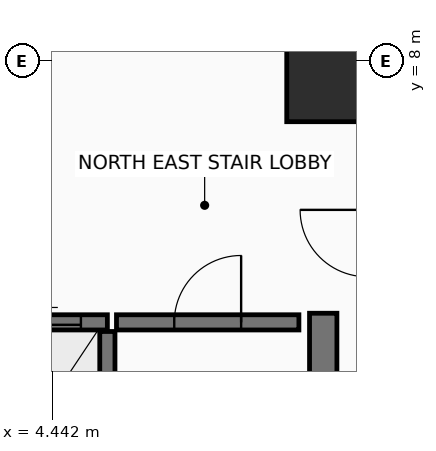
"""IFC4 building model, lengths in metres.
Left out: names, types, materials, properties, quantities, classifications, styles, units other than length and angle.
Written with IfcOpenShell. Run it as: python <this file> out.ifc"""

import sys

from ifc_helpers import new_model, si_unit, direction, frame, frame_2d, origin, origin_2d, place, context, subcontext, project, spatial, rectangle, extrude, element, fill, save


model = new_model("IFC4")
c1 = context("Model", 3, precision=1e-05, world=origin(), true_north=direction((0.0, 1.0)))
c2 = subcontext(c1, "Body", "Model", "MODEL_VIEW")
j1 = project(units=[si_unit("LENGTHUNIT", "METRE"), si_unit("PLANEANGLEUNIT", "RADIAN")], contexts=[c1])
p1 = place(None, origin())
s1 = spatial("IfcSite", under=j1, at=p1, CompositionType="ELEMENT")
p2 = place(p1, origin())
s2 = spatial("IfcBuilding", under=s1, at=p2, CompositionType="ELEMENT")
p3 = place(p2, frame((0.0, 0.0, 170.5)))
s3 = spatial("IfcBuildingStorey", under=s2, at=p3, CompositionType="ELEMENT", Elevation=170.5)
p4 = place(p3, frame((8.9, 7.6, 0.0), z_axis=(0.0, 0.0, 1.0), x_axis=(1.0, 0.0, 0.0)))
e1 = element("IfcColumn", 1, at=p4, inside=s3, PredefinedType="COLUMN", context=c2, shape_type="SweptSolid", body=[
    extrude(rectangle(XDim=1.2, YDim=1.2, at=origin_2d()), origin(), (0.0, 0.0, 1.0), 3.6),
])
p5 = place(p3, frame((8.9, -6.85, 0.0), z_axis=(0.0, 0.0, 1.0), x_axis=(0.0, 1.0, 0.0)))
e2 = element("IfcWall", 2, at=p5, inside=s3, PredefinedType="SHEAR", context=c2, shape_type="SweptSolid", body=[
    extrude(rectangle(XDim=10.7, YDim=0.45, at=frame_2d((5.35, 0.0))), origin(), (0.0, 0.0, 1.0), 3.42),
])
p6 = place(p3, frame((5.35, -3.75, 0.0), z_axis=(0.0, 0.0, 1.0), x_axis=(0.0, 1.0, 0.0)))
e3 = element("IfcWall", 3, at=p6, inside=s3, PredefinedType="SHEAR", context=c2, shape_type="SweptSolid", body=[
    extrude(rectangle(XDim=7.3, YDim=0.25, at=frame_2d((3.65, 0.0))), origin(), (0.0, 0.0, 1.0), 3.42),
])
p7 = place(p3, frame((5.5, 3.7, 0.0), z_axis=(0.0, 0.0, 1.0), x_axis=(1.0, 0.0, 0.0)))
e4 = element("IfcWall", 4, at=p7, inside=s3, PredefinedType="SHEAR", context=c2, shape_type="SweptSolid", body=[
    extrude(rectangle(XDim=3.0, YDim=0.25, at=frame_2d((1.5, 0.0))), origin(), (0.0, 0.0, 1.0), 3.42),
])
p8 = place(p7, frame((0.95, 0.0, 0.0)))
e5 = element("IfcOpeningElement", 5, at=p8, cuts=e4, PredefinedType="OPENING", context=c2, shape_type="SweptSolid", body=[
    extrude(rectangle(XDim=1.1, YDim=2.15, at=frame_2d((0.55, 1.075))), frame((0.0, 0.135, 0.0), z_axis=(0.0, -1.0, 0.0), x_axis=(1.0, 0.0, 0.0)), (0.0, 0.0, 1.0), 0.27),
])
p9 = place(p3, frame((3.28, 3.7, 0.0), z_axis=(0.0, 0.0, 1.0), x_axis=(1.0, 0.0, 0.0)))
e6 = element("IfcWall", 6, at=p9, inside=s3, PredefinedType="SHEAR", context=c2, shape_type="SweptSolid", body=[
    extrude(rectangle(XDim=2.07, YDim=0.25, at=frame_2d((1.035, 0.0))), origin(), (0.0, 0.0, 1.0), 3.42),
])
p10 = place(p9, frame((0.435, 0.0, 0.0)))
e7 = element("IfcOpeningElement", 7, at=p10, cuts=e6, PredefinedType="OPENING", context=c2, shape_type="SweptSolid", body=[
    extrude(rectangle(XDim=1.2, YDim=2.2, at=frame_2d((0.6, 1.1))), frame((0.0, 0.135, 0.0), z_axis=(0.0, -1.0, 0.0), x_axis=(1.0, 0.0, 0.0)), (0.0, 0.0, 1.0), 0.27),
])
p11 = place(p8, frame((1.1, 0.0, 0.0), z_axis=(0.0, 0.0, 1.0), x_axis=(-1.0, 0.0, 0.0)))
e8 = element("IfcDoor", 8, at=p11, inside=s3, OperationType="SINGLE_SWING_LEFT", PredefinedType="DOOR", context=c2, shape_type="SweptSolid", body=[
    extrude(rectangle(XDim=1.1, YDim=2.15, at=frame_2d((0.55, 1.075))), frame((0.0, 0.025, 0.0), z_axis=(0.0, -1.0, 0.0), x_axis=(1.0, 0.0, 0.0)), (0.0, 0.0, 1.0), 0.05),
])
fill(e5, e8)
p12 = place(p10, origin())
e9 = element("IfcDoor", 9, at=p12, inside=s3, OperationType="SLIDING_TO_RIGHT", PredefinedType="DOOR", context=c2, shape_type="SweptSolid", body=[
    extrude(rectangle(XDim=1.2, YDim=2.2, at=frame_2d((0.6, 1.1))), frame((0.0, 0.025, 0.0), z_axis=(0.0, -1.0, 0.0), x_axis=(1.0, 0.0, 0.0)), (0.0, 0.0, 1.0), 0.05),
])
fill(e7, e9)
save(model, sys.argv[1])
